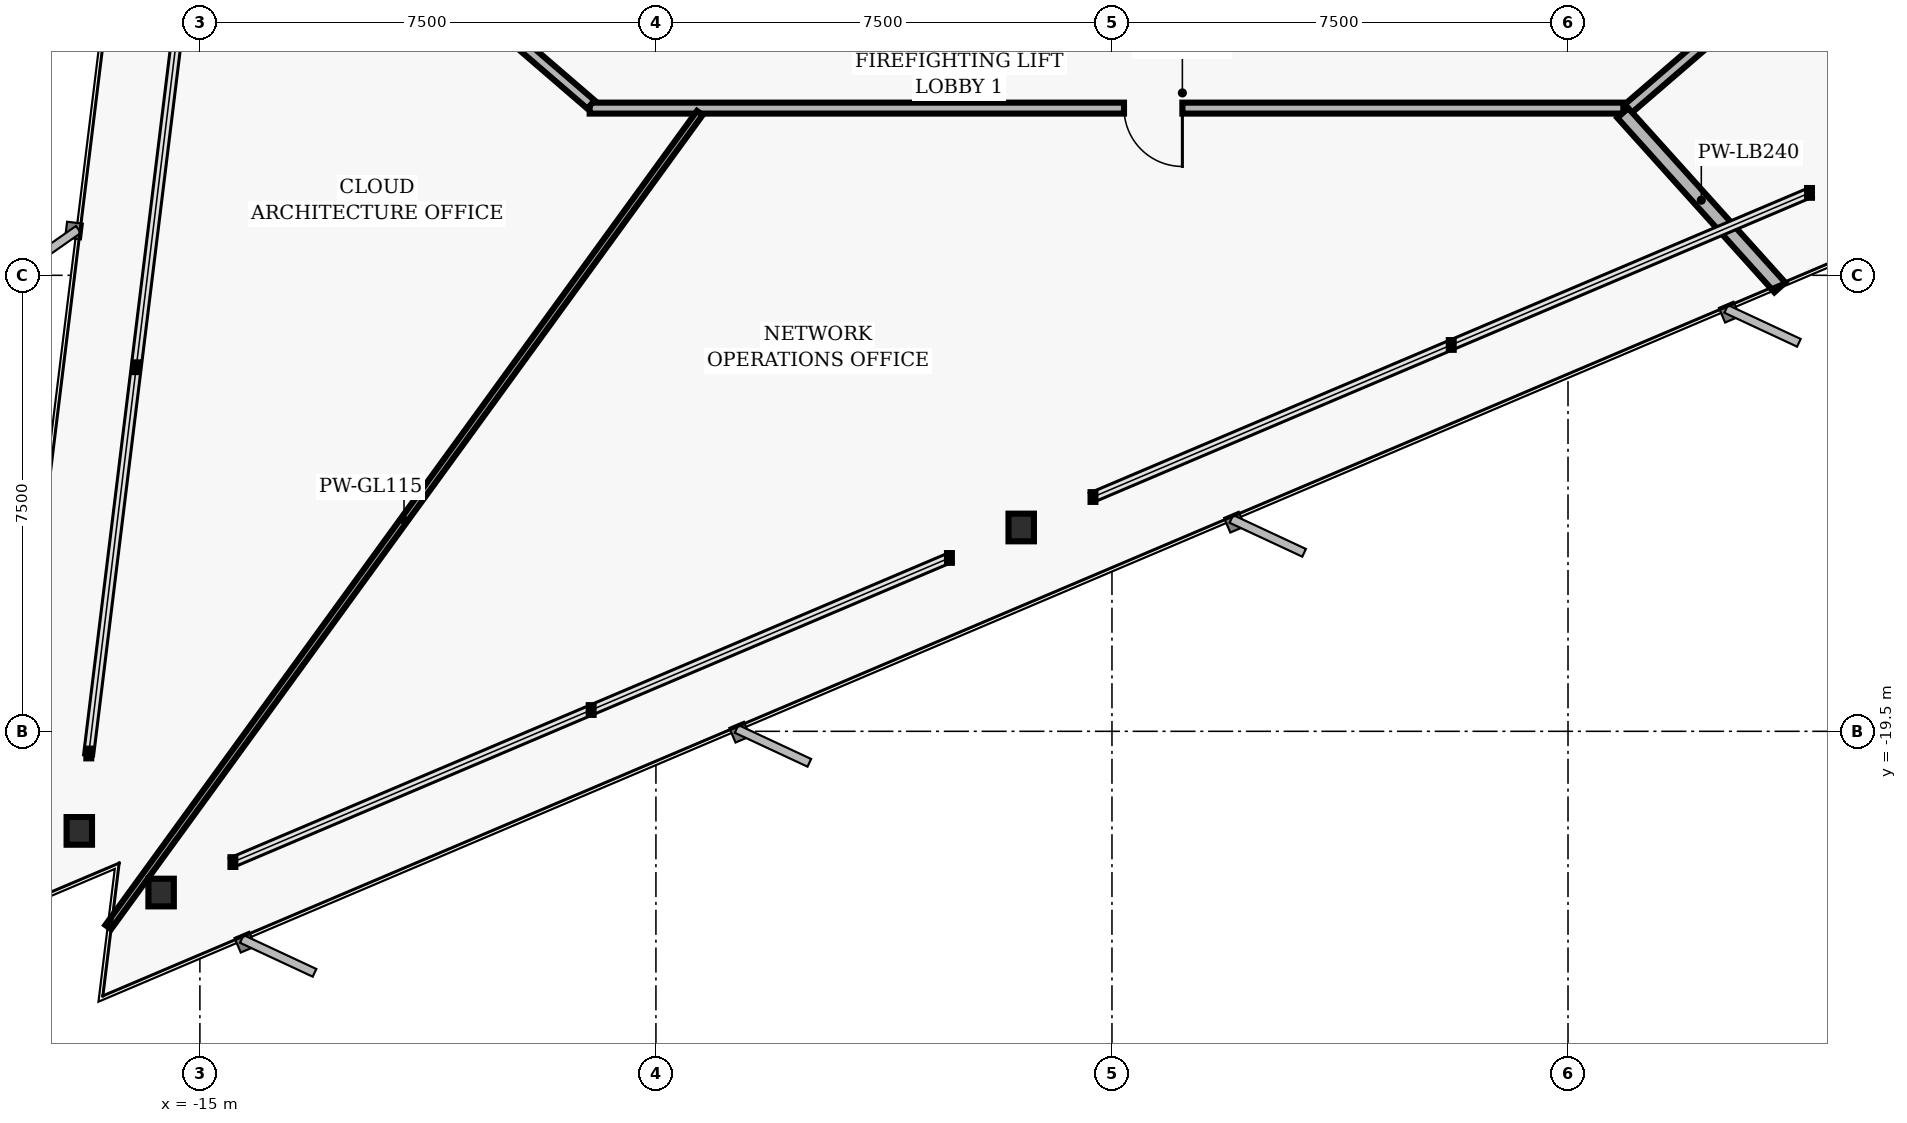
"""IFC4 building model, lengths in metres.
Left out: names, types, materials, properties, quantities, classifications, styles, units other than length and angle.
Written with IfcOpenShell. Run it as: python <this file> out.ifc"""

import sys

from ifc_helpers import new_model, si_unit, direction, frame, frame_2d, origin, origin_2d, place, context, subcontext, project, spatial, rectangle, i_section, extrude, element, fill, save


model = new_model("IFC4")
c1 = context("Model", 3, precision=1e-05, world=origin(), true_north=direction((0.0, 1.0)))
c2 = subcontext(c1, "Body", "Model", "MODEL_VIEW")
j1 = project(units=[si_unit("LENGTHUNIT", "METRE"), si_unit("PLANEANGLEUNIT", "RADIAN")], contexts=[c1])
p1 = place(None, origin())
s1 = spatial("IfcSite", under=j1, at=p1, CompositionType="ELEMENT")
p2 = place(p1, origin())
s2 = spatial("IfcBuilding", under=s1, at=p2, CompositionType="ELEMENT")
p3 = place(p2, frame((0.0, 0.0, 69.76)))
s3 = spatial("IfcBuildingStorey", under=s2, at=p3, CompositionType="ELEMENT", Elevation=69.76)
for number, where, z_axis, x_axis in (
    (1, (-16.983, -21.138, 0.0), (0.0, 0.0, 1.0), (1.0, 0.0, 0.0)),
    (2, (-15.638, -22.152, 0.0), (0.0, 0.0, 1.0), (1.0, 0.0, 0.0)),
    (3, (-1.493, -16.148, 0.0), (0.0, 0.0, 1.0), (1.0, 0.0, 0.0)),
):
    element("IfcColumn", number, at=place(p3, frame(where, z_axis=z_axis, x_axis=x_axis)), inside=s3, PredefinedType="COLUMN", context=c2, shape_type="SweptSolid", body=[
        extrude(i_section(OverallWidth=0.418, OverallDepth=0.455, WebThickness=0.042, FlangeThickness=0.068, FilletRadius=0.025, at=origin_2d()), origin(), (0.0, 0.0, 1.0), 3.36),
    ])
p4 = place(p3, frame((13.268, -5.141, 0.0), z_axis=(0.0, 0.0, 1.0), x_axis=(-0.757534501725, -0.65279512766, 0.0)))
e4 = element("IfcWall", 4, at=p4, inside=s3, PredefinedType="PARTITIONING", context=c2, shape_type="SweptSolid", body=[
    extrude(rectangle(XDim=6.385, YDim=0.18, at=frame_2d((3.192, 0.0))), origin(), (0.0, 0.0, 1.0), 3.073),
])
p5 = place(p4, frame((2.712, 0.0, 0.0)))
e5 = element("IfcOpeningElement", 5, at=p5, cuts=e4, PredefinedType="OPENING", context=c2, shape_type="SweptSolid", body=[
    extrude(rectangle(XDim=0.96, YDim=2.02, at=frame_2d((0.48, 1.01))), frame((0.0, 0.1, 0.0), z_axis=(0.0, -1.0, 0.0), x_axis=(1.0, 0.0, 0.0)), (0.0, 0.0, 1.0), 0.2),
])
p6 = place(p3, frame((8.41, -9.25, 0.0), z_axis=(0.0, 0.0, 1.0), x_axis=(-1.0, 0.0, 0.0)))
e6 = element("IfcWall", 6, at=p6, inside=s3, PredefinedType="PARTITIONING", context=c2, shape_type="SweptSolid", body=[
    extrude(rectangle(XDim=17.0, YDim=0.18, at=frame_2d((8.5, 0.0))), origin(), (0.0, 0.0, 1.0), 2.587),
])
p7 = place(p6, frame((7.252, 0.0, 0.0)))
e7 = element("IfcOpeningElement", 7, at=p7, cuts=e6, PredefinedType="OPENING", context=c2, shape_type="SweptSolid", body=[
    extrude(rectangle(XDim=0.96, YDim=2.02, at=frame_2d((0.48, 1.01))), frame((0.0, 0.1, 0.0), z_axis=(0.0, -1.0, 0.0), x_axis=(1.0, 0.0, 0.0)), (0.0, 0.0, 1.0), 0.2),
])
p8 = place(p3, frame((-8.568, -9.191, 0.0), z_axis=(0.0, 0.0, 1.0), x_axis=(-0.757556899173, 0.652769135694, 0.0)))
e8 = element("IfcWall", 8, at=p8, inside=s3, PredefinedType="PARTITIONING", context=c2, shape_type="SweptSolid", body=[
    extrude(rectangle(XDim=6.204, YDim=0.18, at=frame_2d((3.102, 0.0))), origin(), (0.0, 0.0, 1.0), 3.073),
])
p9 = place(p3, frame((-6.779, -9.33, 0.0), z_axis=(0.0, 0.0, 1.0), x_axis=(-0.587788360635, -0.809014736023, 0.0)))
e9 = element("IfcWall", 9, at=p9, inside=s3, PredefinedType="MOVABLE", context=c2, shape_type="SweptSolid", body=[
    extrude(rectangle(XDim=16.552, YDim=0.115, at=frame_2d((8.276, 0.0))), origin(), (0.0, 0.0, 1.0), 2.358),
])
p10 = place(p3, frame((8.401, -9.33, 0.0), z_axis=(0.0, 0.0, 1.0), x_axis=(0.669139425, -0.743136885043, 0.0)))
e10 = element("IfcWall", 10, at=p10, inside=s3, PredefinedType="PARTITIONING", context=c2, shape_type="SweptSolid", body=[
    extrude(rectangle(XDim=3.86, YDim=0.24, at=frame_2d((1.93, 0.0))), origin(), (0.0, 0.0, 1.0), 3.073),
])
p11 = place(p7, origin())
e11 = element("IfcDoor", 11, at=p11, inside=s3, OperationType="SINGLE_SWING_LEFT", PredefinedType="DOOR", context=c2, shape_type="SweptSolid", body=[
    extrude(rectangle(XDim=0.96, YDim=2.02, at=frame_2d((0.48, 1.01))), frame((0.0, 0.025, 0.0), z_axis=(0.0, -1.0, 0.0), x_axis=(1.0, 0.0, 0.0)), (0.0, 0.0, 1.0), 0.05),
])
fill(e7, e11)
save(model, sys.argv[1])
